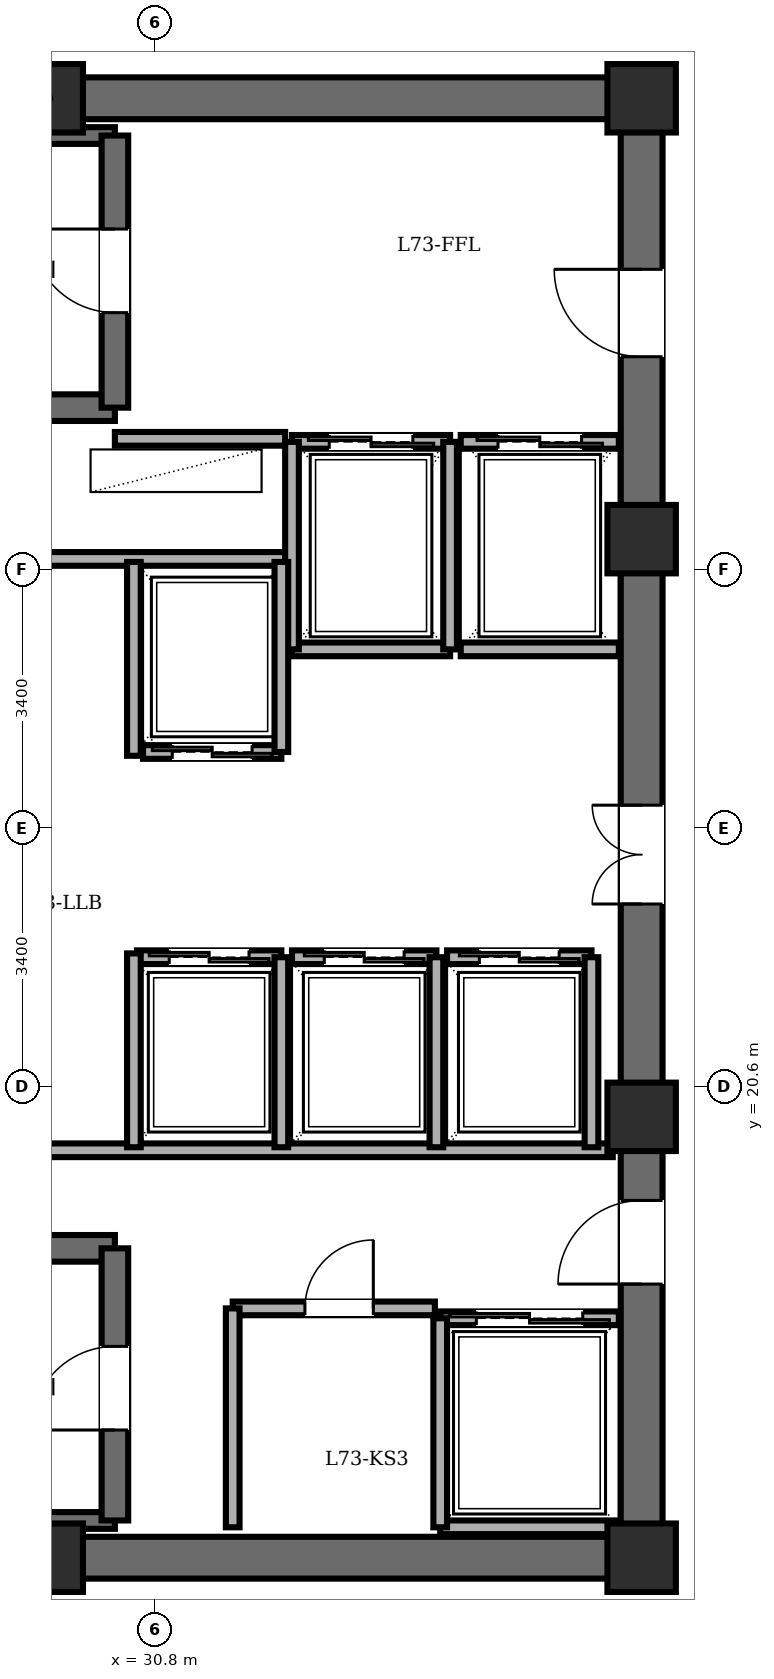
"""IFC4 building model, lengths in metres.
Left out: names, types, materials, properties, quantities, classifications, styles, units other than length and angle.
Written with IfcOpenShell. Run it as: python <this file> out.ifc"""

import sys

from ifc_helpers import new_model, si_unit, direction, frame, frame_2d, origin, origin_2d, place, context, subcontext, project, spatial, rectangle, extrude, element, fill, save


model = new_model("IFC4")
c1 = context("Model", 3, precision=1e-05, world=origin(), true_north=direction((0.0, 1.0)))
c2 = subcontext(c1, "Body", "Model", "MODEL_VIEW")
j1 = project(units=[si_unit("LENGTHUNIT", "METRE"), si_unit("PLANEANGLEUNIT", "RADIAN")], contexts=[c1])
p1 = place(None, origin())
s1 = spatial("IfcSite", under=j1, at=p1, CompositionType="ELEMENT")
p2 = place(p1, origin())
s2 = spatial("IfcBuilding", under=s1, at=p2, CompositionType="ELEMENT")
p3 = place(p2, frame((0.0, 0.0, 280.7)))
s3 = spatial("IfcBuildingStorey", under=s2, at=p3, CompositionType="ELEMENT", Elevation=280.7)
for number, where, z_axis, x_axis in (
    (1, (29.4, 14.4, 0.0), (0.0, 0.0, 1.0), (1.0, 0.0, 0.0)),
    (2, (37.2, 14.4, 0.0), (0.0, 0.0, 1.0), (1.0, 0.0, 0.0)),
    (3, (37.2, 20.2, 0.0), (0.0, 0.0, 1.0), (1.0, 0.0, 0.0)),
    (4, (37.2, 27.8, 0.0), (0.0, 0.0, 1.0), (1.0, 0.0, 0.0)),
    (5, (37.2, 33.6, 0.0), (0.0, 0.0, 1.0), (1.0, 0.0, 0.0)),
    (6, (29.4, 33.6, 0.0), (0.0, 0.0, 1.0), (1.0, 0.0, 0.0)),
):
    element("IfcColumn", number, at=place(p3, frame(where, z_axis=z_axis, x_axis=x_axis)), inside=s3, PredefinedType="COLUMN", context=c2, shape_type="SweptSolid", body=[
        extrude(rectangle(XDim=0.9, YDim=0.9, at=origin_2d()), origin(), (0.0, 0.0, 1.0), 3.65),
    ])
for number, where, z_axis, x_axis in (
    (7, (21.6, 33.6, 0.0), (0.0, 0.0, 1.0), (1.0, 0.0, 0.0)),
    (8, (37.2, 14.4, 0.0), (0.0, 0.0, 1.0), (-1.0, 0.0, 0.0)),
):
    element("IfcWall", number, at=place(p3, frame(where, z_axis=z_axis, x_axis=x_axis)), inside=s3, PredefinedType="SHEAR", context=c2, shape_type="SweptSolid", body=[
        extrude(rectangle(XDim=15.6, YDim=0.55, at=frame_2d((7.8, 0.0))), origin(), (0.0, 0.0, 1.0), 3.45),
    ])
p4 = place(p3, frame((37.2, 14.4, 0.0), z_axis=(0.0, 0.0, 1.0), x_axis=(0.0, 1.0, 0.0)))
e9 = element("IfcWall", 9, at=p4, inside=s3, PredefinedType="SHEAR", context=c2, shape_type="SweptSolid", body=[
    extrude(rectangle(XDim=19.2, YDim=0.55, at=frame_2d((9.6, 0.0))), origin(), (0.0, 0.0, 1.0), 3.45),
])
p5 = place(p4, frame((15.8, 0.0, 0.0)))
e10 = element("IfcOpeningElement", 10, at=p5, cuts=e9, PredefinedType="OPENING", context=c2, shape_type="SweptSolid", body=[
    extrude(rectangle(XDim=1.15, YDim=2.15, at=frame_2d((0.575, 1.075))), frame((0.0, 0.285, 0.0), z_axis=(0.0, -1.0, 0.0), x_axis=(1.0, 0.0, 0.0)), (0.0, 0.0, 1.0), 0.57),
])
p6 = place(p4, frame((3.6, 0.0, 0.0)))
e11 = element("IfcOpeningElement", 11, at=p6, cuts=e9, PredefinedType="OPENING", context=c2, shape_type="SweptSolid", body=[
    extrude(rectangle(XDim=1.1, YDim=2.15, at=frame_2d((0.55, 1.075))), frame((0.0, 0.285, 0.0), z_axis=(0.0, -1.0, 0.0), x_axis=(1.0, 0.0, 0.0)), (0.0, 0.0, 1.0), 0.57),
])
p7 = place(p4, frame((8.6, 0.0, 0.0)))
e12 = element("IfcOpeningElement", 12, at=p7, cuts=e9, PredefinedType="OPENING", context=c2, shape_type="SweptSolid", body=[
    extrude(rectangle(XDim=1.3, YDim=2.2, at=frame_2d((0.65, 1.1))), frame((0.0, 0.285, 0.0), z_axis=(0.0, -1.0, 0.0), x_axis=(1.0, 0.0, 0.0)), (0.0, 0.0, 1.0), 0.57),
])
p8 = place(p3, frame((22.48, 29.53, 0.0), z_axis=(0.0, 0.0, 1.0), x_axis=(1.0, 0.0, 0.0)))
e13 = element("IfcWall", 13, at=p8, inside=s3, PredefinedType="SOLIDWALL", context=c2, shape_type="SweptSolid", body=[
    extrude(rectangle(XDim=7.79, YDim=0.35, at=frame_2d((3.895, 0.0))), origin(), (0.0, 0.0, 1.0), 3.45),
])
p9 = place(p3, frame((22.48, 33.11, 0.0), z_axis=(0.0, 0.0, 1.0), x_axis=(1.0, 0.0, 0.0)))
e14 = element("IfcWall", 14, at=p9, inside=s3, PredefinedType="PARTITIONING", context=c2, shape_type="SweptSolid", body=[
    extrude(rectangle(XDim=7.79, YDim=0.22, at=frame_2d((3.895, 0.0))), origin(), (0.0, 0.0, 1.0), 3.45),
])
p10 = place(p3, frame((30.27, 29.53, 0.0), z_axis=(0.0, 0.0, 1.0), x_axis=(0.0, 1.0, 0.0)))
e15 = element("IfcWall", 15, at=p10, inside=s3, PredefinedType="SOLIDWALL", context=c2, shape_type="SweptSolid", body=[
    extrude(rectangle(XDim=3.58, YDim=0.35, at=frame_2d((1.79, 0.0))), origin(), (0.0, 0.0, 1.0), 3.45),
])
p11 = place(p10, frame((1.25, 0.0, 0.0)))
e16 = element("IfcOpeningElement", 16, at=p11, cuts=e15, PredefinedType="OPENING", context=c2, shape_type="SweptSolid", body=[
    extrude(rectangle(XDim=1.1, YDim=2.15, at=frame_2d((0.55, 1.075))), frame((0.0, 0.185, 0.0), z_axis=(0.0, -1.0, 0.0), x_axis=(1.0, 0.0, 0.0)), (0.0, 0.0, 1.0), 0.37),
])
p12 = place(p3, frame((22.48, 18.47, 0.0), z_axis=(0.0, 0.0, 1.0), x_axis=(1.0, 0.0, 0.0)))
e17 = element("IfcWall", 17, at=p12, inside=s3, PredefinedType="SOLIDWALL", context=c2, shape_type="SweptSolid", body=[
    extrude(rectangle(XDim=7.79, YDim=0.35, at=frame_2d((3.895, 0.0))), origin(), (0.0, 0.0, 1.0), 3.45),
])
p13 = place(p3, frame((22.48, 14.89, 0.0), z_axis=(0.0, 0.0, 1.0), x_axis=(1.0, 0.0, 0.0)))
e18 = element("IfcWall", 18, at=p13, inside=s3, PredefinedType="PARTITIONING", context=c2, shape_type="SweptSolid", body=[
    extrude(rectangle(XDim=7.79, YDim=0.22, at=frame_2d((3.895, 0.0))), origin(), (0.0, 0.0, 1.0), 3.45),
])
p14 = place(p3, frame((30.27, 14.89, 0.0), z_axis=(0.0, 0.0, 1.0), x_axis=(0.0, 1.0, 0.0)))
e19 = element("IfcWall", 19, at=p14, inside=s3, PredefinedType="SOLIDWALL", context=c2, shape_type="SweptSolid", body=[
    extrude(rectangle(XDim=3.58, YDim=0.35, at=frame_2d((1.79, 0.0))), origin(), (0.0, 0.0, 1.0), 3.45),
])
p15 = place(p14, frame((1.19, 0.0, 0.0)))
e20 = element("IfcOpeningElement", 20, at=p15, cuts=e19, PredefinedType="OPENING", context=c2, shape_type="SweptSolid", body=[
    extrude(rectangle(XDim=1.1, YDim=2.15, at=frame_2d((0.55, 1.075))), frame((0.0, 0.185, 0.0), z_axis=(0.0, -1.0, 0.0), x_axis=(1.0, 0.0, 0.0)), (0.0, 0.0, 1.0), 0.37),
])
p16 = place(p3, frame((30.27, 29.12, 0.0), z_axis=(0.0, 0.0, 1.0), x_axis=(1.0, 0.0, 0.0)))
e21 = element("IfcWall", 21, at=p16, inside=s3, PredefinedType="PARTITIONING", context=c2, shape_type="SweptSolid", body=[
    extrude(rectangle(XDim=2.24, YDim=0.18, at=frame_2d((1.12, 0.0))), origin(), (0.0, 0.0, 1.0), 3.45),
])
p17 = place(p3, frame((21.95, 27.54, 0.0), z_axis=(0.0, 0.0, 1.0), x_axis=(1.0, 0.0, 0.0)))
e22 = element("IfcWall", 22, at=p17, inside=s3, PredefinedType="PARTITIONING", context=c2, shape_type="SweptSolid", body=[
    extrude(rectangle(XDim=10.56, YDim=0.18, at=frame_2d((5.28, 0.0))), origin(), (0.0, 0.0, 1.0), 3.45),
])
p18 = place(p3, frame((21.95, 19.76, 0.0), z_axis=(0.0, 0.0, 1.0), x_axis=(1.0, 0.0, 0.0)))
e23 = element("IfcWall", 23, at=p18, inside=s3, PredefinedType="PARTITIONING", context=c2, shape_type="SweptSolid", body=[
    extrude(rectangle(XDim=14.87, YDim=0.18, at=frame_2d((7.435, 0.0))), origin(), (0.0, 0.0, 1.0), 3.45),
])
p19 = place(p3, frame((31.82, 17.68, 0.0), z_axis=(0.0, 0.0, 1.0), x_axis=(1.0, 0.0, 0.0)))
e24 = element("IfcWall", 24, at=p19, inside=s3, PredefinedType="PARTITIONING", context=c2, shape_type="SweptSolid", body=[
    extrude(rectangle(XDim=2.66, YDim=0.18, at=frame_2d((1.33, 0.0))), origin(), (0.0, 0.0, 1.0), 3.45),
])
p20 = place(p19, frame((0.95, 0.0, 0.0)))
e25 = element("IfcOpeningElement", 25, at=p20, cuts=e24, PredefinedType="OPENING", context=c2, shape_type="SweptSolid", body=[
    extrude(rectangle(XDim=0.9, YDim=2.05, at=frame_2d((0.45, 1.025))), frame((0.0, 0.1, 0.0), z_axis=(0.0, -1.0, 0.0), x_axis=(1.0, 0.0, 0.0)), (0.0, 0.0, 1.0), 0.2),
])
p21 = place(p3, frame((31.82, 14.8, 0.0), z_axis=(0.0, 0.0, 1.0), x_axis=(0.0, 1.0, 0.0)))
e26 = element("IfcWall", 26, at=p21, inside=s3, PredefinedType="PARTITIONING", context=c2, shape_type="SweptSolid", body=[
    extrude(rectangle(XDim=2.88, YDim=0.18, at=frame_2d((1.44, 0.0))), origin(), (0.0, 0.0, 1.0), 3.45),
])
p22 = place(p3, frame((32.6, 29.08, 0.0), z_axis=(0.0, 0.0, 1.0), x_axis=(1.0, 0.0, 0.0)))
e27 = element("IfcWall", 27, at=p22, inside=s3, PredefinedType="PARTITIONING", context=c2, shape_type="SweptSolid", body=[
    extrude(rectangle(XDim=2.08, YDim=0.18, at=frame_2d((1.04, 0.0))), origin(), (0.0, 0.0, 1.0), 3.45),
])
p23 = place(p22, frame((0.49, 0.0, 0.0)))
e28 = element("IfcOpeningElement", 28, at=p23, cuts=e27, PredefinedType="OPENING", context=c2, shape_type="SweptSolid", body=[
    extrude(rectangle(XDim=1.1, YDim=2.2, at=frame_2d((0.55, 1.1))), frame((0.0, 0.1, 0.0), z_axis=(0.0, -1.0, 0.0), x_axis=(1.0, 0.0, 0.0)), (0.0, 0.0, 1.0), 0.2),
])
p24 = place(p3, frame((34.68, 26.35, 0.0), z_axis=(0.0, 0.0, 1.0), x_axis=(-1.0, 0.0, 0.0)))
e29 = element("IfcWall", 29, at=p24, inside=s3, PredefinedType="PARTITIONING", context=c2, shape_type="SweptSolid", body=[
    extrude(rectangle(XDim=2.08, YDim=0.18, at=frame_2d((1.04, 0.0))), origin(), (0.0, 0.0, 1.0), 3.45),
])
for number, where, z_axis, x_axis in (
    (30, (34.68, 26.35, 0.0), (0.0, 0.0, 1.0), (0.0, 1.0, 0.0)),
    (31, (32.6, 29.08, 0.0), (0.0, 0.0, 1.0), (0.0, -1.0, 0.0)),
):
    element("IfcWall", number, at=place(p3, frame(where, z_axis=z_axis, x_axis=x_axis)), inside=s3, PredefinedType="PARTITIONING", context=c2, shape_type="SweptSolid", body=[
        extrude(rectangle(XDim=2.73, YDim=0.18, at=frame_2d((1.365, 0.0))), origin(), (0.0, 0.0, 1.0), 3.45),
    ])
p25 = place(p3, frame((34.82, 29.08, 0.0), z_axis=(0.0, 0.0, 1.0), x_axis=(1.0, 0.0, 0.0)))
e32 = element("IfcWall", 32, at=p25, inside=s3, PredefinedType="PARTITIONING", context=c2, shape_type="SweptSolid", body=[
    extrude(rectangle(XDim=2.08, YDim=0.18, at=frame_2d((1.04, 0.0))), origin(), (0.0, 0.0, 1.0), 3.45),
])
p26 = place(p25, frame((0.49, 0.0, 0.0)))
e33 = element("IfcOpeningElement", 33, at=p26, cuts=e32, PredefinedType="OPENING", context=c2, shape_type="SweptSolid", body=[
    extrude(rectangle(XDim=1.1, YDim=2.2, at=frame_2d((0.55, 1.1))), frame((0.0, 0.1, 0.0), z_axis=(0.0, -1.0, 0.0), x_axis=(1.0, 0.0, 0.0)), (0.0, 0.0, 1.0), 0.2),
])
p27 = place(p3, frame((36.9, 26.35, 0.0), z_axis=(0.0, 0.0, 1.0), x_axis=(-1.0, 0.0, 0.0)))
e34 = element("IfcWall", 34, at=p27, inside=s3, PredefinedType="PARTITIONING", context=c2, shape_type="SweptSolid", body=[
    extrude(rectangle(XDim=2.08, YDim=0.18, at=frame_2d((1.04, 0.0))), origin(), (0.0, 0.0, 1.0), 3.45),
])
p28 = place(p3, frame((34.55, 17.55, 0.0), z_axis=(0.0, 0.0, 1.0), x_axis=(1.0, 0.0, 0.0)))
e35 = element("IfcWall", 35, at=p28, inside=s3, PredefinedType="PARTITIONING", context=c2, shape_type="SweptSolid", body=[
    extrude(rectangle(XDim=2.35, YDim=0.18, at=frame_2d((1.175, 0.0))), origin(), (0.0, 0.0, 1.0), 3.45),
])
p29 = place(p28, frame((0.475, 0.0, 0.0)))
e36 = element("IfcOpeningElement", 36, at=p29, cuts=e35, PredefinedType="OPENING", context=c2, shape_type="SweptSolid", body=[
    extrude(rectangle(XDim=1.4, YDim=2.3, at=frame_2d((0.7, 1.15))), frame((0.0, 0.1, 0.0), z_axis=(0.0, -1.0, 0.0), x_axis=(1.0, 0.0, 0.0)), (0.0, 0.0, 1.0), 0.2),
])
p30 = place(p3, frame((36.9, 14.8, 0.0), z_axis=(0.0, 0.0, 1.0), x_axis=(-1.0, 0.0, 0.0)))
e37 = element("IfcWall", 37, at=p30, inside=s3, PredefinedType="PARTITIONING", context=c2, shape_type="SweptSolid", body=[
    extrude(rectangle(XDim=2.35, YDim=0.18, at=frame_2d((1.175, 0.0))), origin(), (0.0, 0.0, 1.0), 3.45),
])
p31 = place(p3, frame((34.55, 17.55, 0.0), z_axis=(0.0, 0.0, 1.0), x_axis=(0.0, -1.0, 0.0)))
e38 = element("IfcWall", 38, at=p31, inside=s3, PredefinedType="PARTITIONING", context=c2, shape_type="SweptSolid", body=[
    extrude(rectangle(XDim=2.75, YDim=0.18, at=frame_2d((1.375, 0.0))), origin(), (0.0, 0.0, 1.0), 3.45),
])
p32 = place(p3, frame((32.46, 25.0, 0.0), z_axis=(0.0, 0.0, 1.0), x_axis=(-1.0, 0.0, 0.0)))
e39 = element("IfcWall", 39, at=p32, inside=s3, PredefinedType="PARTITIONING", context=c2, shape_type="SweptSolid", body=[
    extrude(rectangle(XDim=1.82, YDim=0.18, at=frame_2d((0.91, 0.0))), origin(), (0.0, 0.0, 1.0), 3.45),
])
p33 = place(p32, frame((0.385, 0.0, 0.0)))
e40 = element("IfcOpeningElement", 40, at=p33, cuts=e39, PredefinedType="OPENING", context=c2, shape_type="SweptSolid", body=[
    extrude(rectangle(XDim=1.05, YDim=2.2, at=frame_2d((0.525, 1.1))), frame((0.0, 0.1, 0.0), z_axis=(0.0, -1.0, 0.0), x_axis=(1.0, 0.0, 0.0)), (0.0, 0.0, 1.0), 0.2),
])
p34 = place(p3, frame((32.46, 25.0, 0.0), z_axis=(0.0, 0.0, 1.0), x_axis=(0.0, 1.0, 0.0)))
e41 = element("IfcWall", 41, at=p34, inside=s3, PredefinedType="PARTITIONING", context=c2, shape_type="SweptSolid", body=[
    extrude(rectangle(XDim=2.5, YDim=0.18, at=frame_2d((1.25, 0.0))), origin(), (0.0, 0.0, 1.0), 3.45),
])
p35 = place(p3, frame((30.56, 22.3, 0.0), z_axis=(0.0, 0.0, 1.0), x_axis=(1.0, 0.0, 0.0)))
e42 = element("IfcWall", 42, at=p35, inside=s3, PredefinedType="PARTITIONING", context=c2, shape_type="SweptSolid", body=[
    extrude(rectangle(XDim=1.9, YDim=0.18, at=frame_2d((0.95, 0.0))), origin(), (0.0, 0.0, 1.0), 3.45),
])
p36 = place(p35, frame((0.425, 0.0, 0.0)))
e43 = element("IfcOpeningElement", 43, at=p36, cuts=e42, PredefinedType="OPENING", context=c2, shape_type="SweptSolid", body=[
    extrude(rectangle(XDim=1.05, YDim=2.2, at=frame_2d((0.525, 1.1))), frame((0.0, 0.1, 0.0), z_axis=(0.0, -1.0, 0.0), x_axis=(1.0, 0.0, 0.0)), (0.0, 0.0, 1.0), 0.2),
])
p37 = place(p3, frame((32.46, 19.8, 0.0), z_axis=(0.0, 0.0, 1.0), x_axis=(0.0, 1.0, 0.0)))
e44 = element("IfcWall", 44, at=p37, inside=s3, PredefinedType="PARTITIONING", context=c2, shape_type="SweptSolid", body=[
    extrude(rectangle(XDim=2.5, YDim=0.18, at=frame_2d((1.25, 0.0))), origin(), (0.0, 0.0, 1.0), 3.45),
])
p38 = place(p3, frame((32.6, 22.3, 0.0), z_axis=(0.0, 0.0, 1.0), x_axis=(1.0, 0.0, 0.0)))
e45 = element("IfcWall", 45, at=p38, inside=s3, PredefinedType="PARTITIONING", context=c2, shape_type="SweptSolid", body=[
    extrude(rectangle(XDim=1.9, YDim=0.18, at=frame_2d((0.95, 0.0))), origin(), (0.0, 0.0, 1.0), 3.45),
])
p39 = place(p38, frame((0.425, 0.0, 0.0)))
e46 = element("IfcOpeningElement", 46, at=p39, cuts=e45, PredefinedType="OPENING", context=c2, shape_type="SweptSolid", body=[
    extrude(rectangle(XDim=1.05, YDim=2.2, at=frame_2d((0.525, 1.1))), frame((0.0, 0.1, 0.0), z_axis=(0.0, -1.0, 0.0), x_axis=(1.0, 0.0, 0.0)), (0.0, 0.0, 1.0), 0.2),
])
p40 = place(p3, frame((34.5, 19.8, 0.0), z_axis=(0.0, 0.0, 1.0), x_axis=(0.0, 1.0, 0.0)))
e47 = element("IfcWall", 47, at=p40, inside=s3, PredefinedType="PARTITIONING", context=c2, shape_type="SweptSolid", body=[
    extrude(rectangle(XDim=2.5, YDim=0.18, at=frame_2d((1.25, 0.0))), origin(), (0.0, 0.0, 1.0), 3.45),
])
p41 = place(p3, frame((34.64, 22.3, 0.0), z_axis=(0.0, 0.0, 1.0), x_axis=(1.0, 0.0, 0.0)))
e48 = element("IfcWall", 48, at=p41, inside=s3, PredefinedType="PARTITIONING", context=c2, shape_type="SweptSolid", body=[
    extrude(rectangle(XDim=1.9, YDim=0.18, at=frame_2d((0.95, 0.0))), origin(), (0.0, 0.0, 1.0), 3.45),
])
p42 = place(p41, frame((0.425, 0.0, 0.0)))
e49 = element("IfcOpeningElement", 49, at=p42, cuts=e48, PredefinedType="OPENING", context=c2, shape_type="SweptSolid", body=[
    extrude(rectangle(XDim=1.05, YDim=2.2, at=frame_2d((0.525, 1.1))), frame((0.0, 0.1, 0.0), z_axis=(0.0, -1.0, 0.0), x_axis=(1.0, 0.0, 0.0)), (0.0, 0.0, 1.0), 0.2),
])
p43 = place(p3, frame((36.54, 19.8, 0.0), z_axis=(0.0, 0.0, 1.0), x_axis=(0.0, 1.0, 0.0)))
e50 = element("IfcWall", 50, at=p43, inside=s3, PredefinedType="PARTITIONING", context=c2, shape_type="SweptSolid", body=[
    extrude(rectangle(XDim=2.5, YDim=0.18, at=frame_2d((1.25, 0.0))), origin(), (0.0, 0.0, 1.0), 3.45),
])
for number, where, z_axis, x_axis in (
    (51, (30.52, 24.95, 0.0), (0.0, 0.0, 1.0), (0.0, 1.0, 0.0)),
    (52, (30.52, 19.8, 0.0), (0.0, 0.0, 1.0), (0.0, 1.0, 0.0)),
):
    element("IfcWall", number, at=place(p3, frame(where, z_axis=z_axis, x_axis=x_axis)), inside=s3, PredefinedType="PARTITIONING", context=c2, shape_type="SweptSolid", body=[
        extrude(rectangle(XDim=2.55, YDim=0.18, at=frame_2d((1.275, 0.0))), origin(), (0.0, 0.0, 1.0), 3.45),
    ])
p44 = place(p11, origin())
e53 = element("IfcDoor", 53, at=p44, inside=s3, OperationType="SINGLE_SWING_RIGHT", PredefinedType="DOOR", context=c2, shape_type="SweptSolid", body=[
    extrude(rectangle(XDim=1.1, YDim=2.15, at=frame_2d((0.55, 1.075))), frame((0.0, 0.025, 0.0), z_axis=(0.0, -1.0, 0.0), x_axis=(1.0, 0.0, 0.0)), (0.0, 0.0, 1.0), 0.05),
])
fill(e16, e53)
p45 = place(p15, origin())
e54 = element("IfcDoor", 54, at=p45, inside=s3, OperationType="SINGLE_SWING_LEFT", PredefinedType="DOOR", context=c2, shape_type="SweptSolid", body=[
    extrude(rectangle(XDim=1.1, YDim=2.15, at=frame_2d((0.55, 1.075))), frame((0.0, 0.025, 0.0), z_axis=(0.0, -1.0, 0.0), x_axis=(1.0, 0.0, 0.0)), (0.0, 0.0, 1.0), 0.05),
])
fill(e20, e54)
p46 = place(p5, origin())
e55 = element("IfcDoor", 55, at=p46, inside=s3, OperationType="SINGLE_SWING_RIGHT", PredefinedType="DOOR", context=c2, shape_type="SweptSolid", body=[
    extrude(rectangle(XDim=1.15, YDim=2.15, at=frame_2d((0.575, 1.075))), frame((0.0, 0.025, 0.0), z_axis=(0.0, -1.0, 0.0), x_axis=(1.0, 0.0, 0.0)), (0.0, 0.0, 1.0), 0.05),
])
fill(e10, e55)
p47 = place(p6, origin())
e56 = element("IfcDoor", 56, at=p47, inside=s3, OperationType="SINGLE_SWING_LEFT", PredefinedType="DOOR", context=c2, shape_type="SweptSolid", body=[
    extrude(rectangle(XDim=1.1, YDim=2.15, at=frame_2d((0.55, 1.075))), frame((0.0, 0.025, 0.0), z_axis=(0.0, -1.0, 0.0), x_axis=(1.0, 0.0, 0.0)), (0.0, 0.0, 1.0), 0.05),
])
fill(e11, e56)
p48 = place(p20, origin())
e57 = element("IfcDoor", 57, at=p48, inside=s3, OperationType="SINGLE_SWING_RIGHT", PredefinedType="DOOR", context=c2, shape_type="SweptSolid", body=[
    extrude(rectangle(XDim=0.9, YDim=2.05, at=frame_2d((0.45, 1.025))), frame((0.0, 0.025, 0.0), z_axis=(0.0, -1.0, 0.0), x_axis=(1.0, 0.0, 0.0)), (0.0, 0.0, 1.0), 0.05),
])
fill(e25, e57)
p49 = place(p23, origin())
e58 = element("IfcDoor", 58, at=p49, inside=s3, OperationType="DOUBLE_DOOR_SLIDING", PredefinedType="DOOR", context=c2, shape_type="SweptSolid", body=[
    extrude(rectangle(XDim=1.1, YDim=2.2, at=frame_2d((0.55, 1.1))), frame((0.0, 0.025, 0.0), z_axis=(0.0, -1.0, 0.0), x_axis=(1.0, 0.0, 0.0)), (0.0, 0.0, 1.0), 0.05),
])
fill(e28, e58)
p50 = place(p26, origin())
e59 = element("IfcDoor", 59, at=p50, inside=s3, OperationType="DOUBLE_DOOR_SLIDING", PredefinedType="DOOR", context=c2, shape_type="SweptSolid", body=[
    extrude(rectangle(XDim=1.1, YDim=2.2, at=frame_2d((0.55, 1.1))), frame((0.0, 0.025, 0.0), z_axis=(0.0, -1.0, 0.0), x_axis=(1.0, 0.0, 0.0)), (0.0, 0.0, 1.0), 0.05),
])
fill(e33, e59)
p51 = place(p29, origin())
e60 = element("IfcDoor", 60, at=p51, inside=s3, OperationType="DOUBLE_DOOR_SLIDING", PredefinedType="DOOR", context=c2, shape_type="SweptSolid", body=[
    extrude(rectangle(XDim=1.4, YDim=2.3, at=frame_2d((0.7, 1.15))), frame((0.0, 0.025, 0.0), z_axis=(0.0, -1.0, 0.0), x_axis=(1.0, 0.0, 0.0)), (0.0, 0.0, 1.0), 0.05),
])
fill(e36, e60)
p52 = place(p33, origin())
e61 = element("IfcDoor", 61, at=p52, inside=s3, OperationType="DOUBLE_DOOR_SLIDING", PredefinedType="DOOR", context=c2, shape_type="SweptSolid", body=[
    extrude(rectangle(XDim=1.05, YDim=2.2, at=frame_2d((0.525, 1.1))), frame((0.0, 0.025, 0.0), z_axis=(0.0, -1.0, 0.0), x_axis=(1.0, 0.0, 0.0)), (0.0, 0.0, 1.0), 0.05),
])
fill(e40, e61)
p53 = place(p36, origin())
e62 = element("IfcDoor", 62, at=p53, inside=s3, OperationType="DOUBLE_DOOR_SLIDING", PredefinedType="DOOR", context=c2, shape_type="SweptSolid", body=[
    extrude(rectangle(XDim=1.05, YDim=2.2, at=frame_2d((0.525, 1.1))), frame((0.0, 0.025, 0.0), z_axis=(0.0, -1.0, 0.0), x_axis=(1.0, 0.0, 0.0)), (0.0, 0.0, 1.0), 0.05),
])
fill(e43, e62)
p54 = place(p39, origin())
e63 = element("IfcDoor", 63, at=p54, inside=s3, OperationType="DOUBLE_DOOR_SLIDING", PredefinedType="DOOR", context=c2, shape_type="SweptSolid", body=[
    extrude(rectangle(XDim=1.05, YDim=2.2, at=frame_2d((0.525, 1.1))), frame((0.0, 0.025, 0.0), z_axis=(0.0, -1.0, 0.0), x_axis=(1.0, 0.0, 0.0)), (0.0, 0.0, 1.0), 0.05),
])
fill(e46, e63)
p55 = place(p42, origin())
e64 = element("IfcDoor", 64, at=p55, inside=s3, OperationType="DOUBLE_DOOR_SLIDING", PredefinedType="DOOR", context=c2, shape_type="SweptSolid", body=[
    extrude(rectangle(XDim=1.05, YDim=2.2, at=frame_2d((0.525, 1.1))), frame((0.0, 0.025, 0.0), z_axis=(0.0, -1.0, 0.0), x_axis=(1.0, 0.0, 0.0)), (0.0, 0.0, 1.0), 0.05),
])
fill(e49, e64)
p56 = place(p7, origin())
e65 = element("IfcDoor", 65, at=p56, inside=s3, OperationType="DOUBLE_DOOR_SINGLE_SWING", PredefinedType="DOOR", context=c2, shape_type="SweptSolid", body=[
    extrude(rectangle(XDim=1.3, YDim=2.2, at=frame_2d((0.65, 1.1))), frame((0.0, 0.025, 0.0), z_axis=(0.0, -1.0, 0.0), x_axis=(1.0, 0.0, 0.0)), (0.0, 0.0, 1.0), 0.05),
])
fill(e12, e65)
save(model, sys.argv[1])
